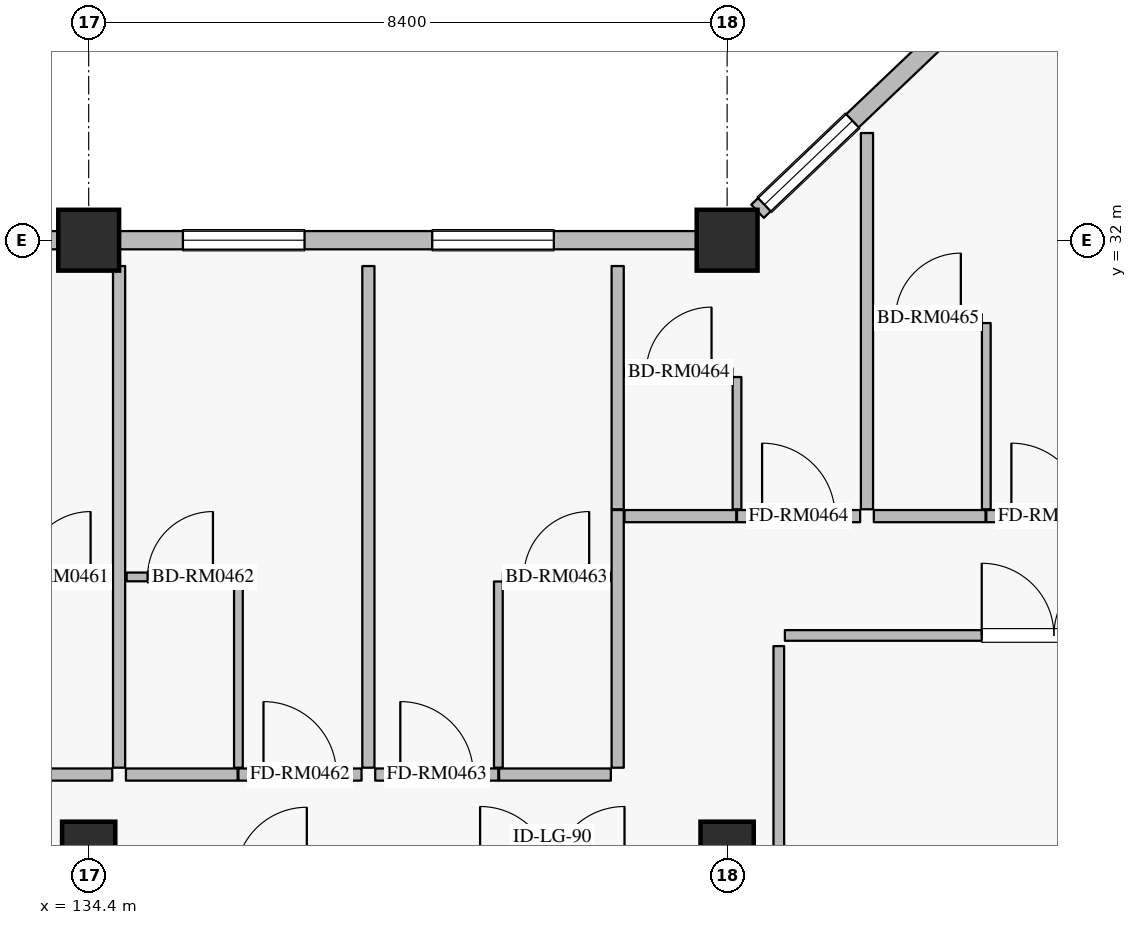
"""IFC4 building model, lengths in metres.
Left out: names, types, materials, properties, quantities, classifications, styles, units other than length and angle.
Written with IfcOpenShell. Run it as: python <this file> out.ifc"""

import sys

from ifc_helpers import new_model, si_unit, direction, frame, frame_2d, origin, origin_2d, place, context, subcontext, project, spatial, rectangle, extrude, element, fill, save


model = new_model("IFC4")
c1 = context("Model", 3, precision=1e-05, world=origin(), true_north=direction((0.0, 1.0)))
c2 = subcontext(c1, "Body", "Model", "MODEL_VIEW")
j1 = project(units=[si_unit("LENGTHUNIT", "METRE"), si_unit("PLANEANGLEUNIT", "RADIAN")], contexts=[c1])
p1 = place(None, origin())
s1 = spatial("IfcSite", under=j1, at=p1, CompositionType="ELEMENT")
p2 = place(p1, origin())
s2 = spatial("IfcBuilding", under=s1, at=p2, CompositionType="ELEMENT")
p3 = place(p2, frame((0.0, 0.0, 16.2)))
s3 = spatial("IfcBuildingStorey", under=s2, at=p3, CompositionType="ELEMENT", Elevation=16.2)
for number, where, z_axis, x_axis in (
    (1, (134.4, 32.0, 0.0), (0.0, 0.0, 1.0), (1.0, 0.0, 0.0)),
    (2, (142.8, 32.0, 0.0), (0.0, 0.0, 1.0), (1.0, 0.0, 0.0)),
):
    element("IfcColumn", number, at=place(p3, frame(where, z_axis=z_axis, x_axis=x_axis)), inside=s3, PredefinedType="COLUMN", context=c2, shape_type="SweptSolid", body=[
        extrude(rectangle(XDim=0.8, YDim=0.8, at=origin_2d()), origin(), (0.0, 0.0, 1.0), 4.8),
    ])
for number, where, z_axis, x_axis in (
    (3, (134.4, 24.0, 0.0), (0.0, 0.0, 1.0), (1.0, 0.0, 0.0)),
    (4, (142.8, 24.0, 0.0), (0.0, 0.0, 1.0), (1.0, 0.0, 0.0)),
):
    element("IfcColumn", number, at=place(p3, frame(where, z_axis=z_axis, x_axis=x_axis)), inside=s3, PredefinedType="COLUMN", context=c2, shape_type="SweptSolid", body=[
        extrude(rectangle(XDim=0.7, YDim=0.7, at=origin_2d()), origin(), (0.0, 0.0, 1.0), 4.8),
    ])
p4 = place(p3, frame((126.4, 32.0, 0.0), z_axis=(0.0, 0.0, 1.0), x_axis=(1.0, 0.0, 0.0)))
e5 = element("IfcWall", 5, at=p4, inside=s3, PredefinedType="SOLIDWALL", context=c2, shape_type="SweptSolid", body=[
    extrude(rectangle(XDim=7.6, YDim=0.24, at=frame_2d((3.8, 0.0))), origin(), (0.0, 0.0, 1.0), 4.09),
])
p5 = place(p4, frame((0.17, 0.0, 0.8)))
e6 = element("IfcOpeningElement", 6, at=p5, cuts=e5, PredefinedType="OPENING", context=c2, shape_type="SweptSolid", body=[
    extrude(rectangle(XDim=1.4, YDim=1.6, at=frame_2d((0.7, 0.8))), frame((0.0, 0.13, 0.0), z_axis=(0.0, -1.0, 0.0), x_axis=(1.0, 0.0, 0.0)), (0.0, 0.0, 1.0), 0.26),
])
p6 = place(p4, frame((2.68, 0.0, 0.8)))
e7 = element("IfcOpeningElement", 7, at=p6, cuts=e5, PredefinedType="OPENING", context=c2, shape_type="SweptSolid", body=[
    extrude(rectangle(XDim=1.6, YDim=1.6, at=frame_2d((0.8, 0.8))), frame((0.0, 0.13, 0.0), z_axis=(0.0, -1.0, 0.0), x_axis=(1.0, 0.0, 0.0)), (0.0, 0.0, 1.0), 0.26),
])
p7 = place(p4, frame((5.61, 0.0, 0.8)))
e8 = element("IfcOpeningElement", 8, at=p7, cuts=e5, PredefinedType="OPENING", context=c2, shape_type="SweptSolid", body=[
    extrude(rectangle(XDim=1.6, YDim=1.6, at=frame_2d((0.8, 0.8))), frame((0.0, 0.13, 0.0), z_axis=(0.0, -1.0, 0.0), x_axis=(1.0, 0.0, 0.0)), (0.0, 0.0, 1.0), 0.26),
])
p8 = place(p3, frame((134.8, 32.0, 0.0), z_axis=(0.0, 0.0, 1.0), x_axis=(1.0, 0.0, 0.0)))
e9 = element("IfcWall", 9, at=p8, inside=s3, PredefinedType="SOLIDWALL", context=c2, shape_type="SweptSolid", body=[
    extrude(rectangle(XDim=7.6, YDim=0.24, at=frame_2d((3.8, 0.0))), origin(), (0.0, 0.0, 1.0), 4.13),
])
p9 = place(p8, frame((0.84, 0.0, 0.8)))
e10 = element("IfcOpeningElement", 10, at=p9, cuts=e9, PredefinedType="OPENING", context=c2, shape_type="SweptSolid", body=[
    extrude(rectangle(XDim=1.6, YDim=1.6, at=frame_2d((0.8, 0.8))), frame((0.0, 0.13, 0.0), z_axis=(0.0, -1.0, 0.0), x_axis=(1.0, 0.0, 0.0)), (0.0, 0.0, 1.0), 0.26),
])
p10 = place(p8, frame((4.12, 0.0, 0.8)))
e11 = element("IfcOpeningElement", 11, at=p10, cuts=e9, PredefinedType="OPENING", context=c2, shape_type="SweptSolid", body=[
    extrude(rectangle(XDim=1.6, YDim=1.6, at=frame_2d((0.8, 0.8))), frame((0.0, 0.13, 0.0), z_axis=(0.0, -1.0, 0.0), x_axis=(1.0, 0.0, 0.0)), (0.0, 0.0, 1.0), 0.26),
])
p11 = place(p3, frame((143.2, 32.381, 0.0), z_axis=(0.0, 0.0, 1.0), x_axis=(0.724156739794, 0.689635422677, 0.0)))
e12 = element("IfcWall", 12, at=p11, inside=s3, PredefinedType="SOLIDWALL", context=c2, shape_type="SweptSolid", body=[
    extrude(rectangle(XDim=10.495, YDim=0.24, at=frame_2d((5.248, 0.0))), origin(), (0.0, 0.0, 1.0), 4.13),
])
p12 = place(p11, frame((0.125, 0.0, 0.8)))
e13 = element("IfcOpeningElement", 13, at=p12, cuts=e12, PredefinedType="OPENING", context=c2, shape_type="SweptSolid", body=[
    extrude(rectangle(XDim=1.6, YDim=1.6, at=frame_2d((0.8, 0.8))), frame((0.0, 0.13, 0.0), z_axis=(0.0, -1.0, 0.0), x_axis=(1.0, 0.0, 0.0)), (0.0, 0.0, 1.0), 0.26),
])
p13 = place(p11, frame((3.453, 0.0, 0.8)))
e14 = element("IfcOpeningElement", 14, at=p13, cuts=e12, PredefinedType="OPENING", context=c2, shape_type="SweptSolid", body=[
    extrude(rectangle(XDim=1.6, YDim=1.6, at=frame_2d((0.8, 0.8))), frame((0.0, 0.13, 0.0), z_axis=(0.0, -1.0, 0.0), x_axis=(1.0, 0.0, 0.0)), (0.0, 0.0, 1.0), 0.26),
])
p14 = place(p11, frame((7.776, 0.0, 0.8)))
e15 = element("IfcOpeningElement", 15, at=p14, cuts=e12, PredefinedType="OPENING", context=c2, shape_type="SweptSolid", body=[
    extrude(rectangle(XDim=1.6, YDim=1.6, at=frame_2d((0.8, 0.8))), frame((0.0, 0.13, 0.0), z_axis=(0.0, -1.0, 0.0), x_axis=(1.0, 0.0, 0.0)), (0.0, 0.0, 1.0), 0.26),
])
p15 = place(p3, frame((133.24, 24.97, 0.0), z_axis=(0.0, 0.0, 1.0), x_axis=(1.0, 0.0, 0.0)))
e16 = element("IfcWall", 16, at=p15, inside=s3, PredefinedType="PARTITIONING", context=c2, shape_type="SweptSolid", body=[
    extrude(rectangle(XDim=1.47, YDim=0.16, at=frame_2d((0.735, 0.0))), origin(), (0.0, 0.0, 1.0), 4.535),
])
p16 = place(p3, frame((133.29, 27.57, 0.0), z_axis=(0.0, 0.0, 1.0), x_axis=(1.0, 0.0, 0.0)))
e17 = element("IfcWall", 17, at=p16, inside=s3, PredefinedType="PARTITIONING", context=c2, shape_type="SweptSolid", body=[
    extrude(rectangle(XDim=1.41, YDim=0.115, at=frame_2d((0.705, 0.0))), origin(), (0.0, 0.0, 1.0), 4.535),
])
p17 = place(p16, frame((0.275, 0.0, 0.0)))
e18 = element("IfcOpeningElement", 18, at=p17, cuts=e17, PredefinedType="OPENING", context=c2, shape_type="SweptSolid", body=[
    extrude(rectangle(XDim=0.86, YDim=2.12, at=frame_2d((0.43, 1.06))), frame((0.0, 0.067, 0.0), z_axis=(0.0, -1.0, 0.0), x_axis=(1.0, 0.0, 0.0)), (0.0, 0.0, 1.0), 0.135),
])
p18 = place(p3, frame((134.89, 24.97, 0.0), z_axis=(0.0, 0.0, 1.0), x_axis=(1.0, 0.0, 0.0)))
e19 = element("IfcWall", 19, at=p18, inside=s3, PredefinedType="PARTITIONING", context=c2, shape_type="SweptSolid", body=[
    extrude(rectangle(XDim=1.47, YDim=0.16, at=frame_2d((0.735, 0.0))), origin(), (0.0, 0.0, 1.0), 4.535),
])
p19 = place(p3, frame((136.37, 24.97, 0.0), z_axis=(0.0, 0.0, 1.0), x_axis=(1.0, 0.0, 0.0)))
e20 = element("IfcWall", 20, at=p19, inside=s3, PredefinedType="PARTITIONING", context=c2, shape_type="SweptSolid", body=[
    extrude(rectangle(XDim=1.62, YDim=0.16, at=frame_2d((0.81, 0.0))), origin(), (0.0, 0.0, 1.0), 4.535),
])
p20 = place(p19, frame((0.33, 0.0, 0.0)))
e21 = element("IfcOpeningElement", 21, at=p20, cuts=e20, PredefinedType="OPENING", context=c2, shape_type="SweptSolid", body=[
    extrude(rectangle(XDim=0.96, YDim=2.2, at=frame_2d((0.48, 1.1))), frame((0.0, 0.09, 0.0), z_axis=(0.0, -1.0, 0.0), x_axis=(1.0, 0.0, 0.0)), (0.0, 0.0, 1.0), 0.18),
])
p21 = place(p3, frame((136.37, 25.06, 0.0), z_axis=(0.0, 0.0, 1.0), x_axis=(0.0, 1.0, 0.0)))
e22 = element("IfcWall", 22, at=p21, inside=s3, PredefinedType="PARTITIONING", context=c2, shape_type="SweptSolid", body=[
    extrude(rectangle(XDim=2.45, YDim=0.115, at=frame_2d((1.225, 0.0))), origin(), (0.0, 0.0, 1.0), 4.535),
])
p22 = place(p3, frame((134.9, 27.57, 0.0), z_axis=(0.0, 0.0, 1.0), x_axis=(1.0, 0.0, 0.0)))
e23 = element("IfcWall", 23, at=p22, inside=s3, PredefinedType="PARTITIONING", context=c2, shape_type="SweptSolid", body=[
    extrude(rectangle(XDim=1.41, YDim=0.115, at=frame_2d((0.705, 0.0))), origin(), (0.0, 0.0, 1.0), 4.535),
])
p23 = place(p22, frame((0.275, 0.0, 0.0)))
e24 = element("IfcOpeningElement", 24, at=p23, cuts=e23, PredefinedType="OPENING", context=c2, shape_type="SweptSolid", body=[
    extrude(rectangle(XDim=0.86, YDim=2.12, at=frame_2d((0.43, 1.06))), frame((0.0, 0.067, 0.0), z_axis=(0.0, -1.0, 0.0), x_axis=(1.0, 0.0, 0.0)), (0.0, 0.0, 1.0), 0.135),
])
p24 = place(p3, frame((134.8, 25.06, 0.0), z_axis=(0.0, 0.0, 1.0), x_axis=(0.0, 1.0, 0.0)))
e25 = element("IfcWall", 25, at=p24, inside=s3, PredefinedType="PARTITIONING", context=c2, shape_type="SweptSolid", body=[
    extrude(rectangle(XDim=6.6, YDim=0.16, at=frame_2d((3.3, 0.0))), origin(), (0.0, 0.0, 1.0), 4.535),
])
p25 = place(p3, frame((138.17, 24.97, 0.0), z_axis=(0.0, 0.0, 1.0), x_axis=(1.0, 0.0, 0.0)))
e26 = element("IfcWall", 26, at=p25, inside=s3, PredefinedType="PARTITIONING", context=c2, shape_type="SweptSolid", body=[
    extrude(rectangle(XDim=1.62, YDim=0.16, at=frame_2d((0.81, 0.0))), origin(), (0.0, 0.0, 1.0), 4.535),
])
p26 = place(p25, frame((0.33, 0.0, 0.0)))
e27 = element("IfcOpeningElement", 27, at=p26, cuts=e26, PredefinedType="OPENING", context=c2, shape_type="SweptSolid", body=[
    extrude(rectangle(XDim=0.96, YDim=2.2, at=frame_2d((0.48, 1.1))), frame((0.0, 0.09, 0.0), z_axis=(0.0, -1.0, 0.0), x_axis=(1.0, 0.0, 0.0)), (0.0, 0.0, 1.0), 0.18),
])
p27 = place(p3, frame((139.8, 24.97, 0.0), z_axis=(0.0, 0.0, 1.0), x_axis=(1.0, 0.0, 0.0)))
e28 = element("IfcWall", 28, at=p27, inside=s3, PredefinedType="PARTITIONING", context=c2, shape_type="SweptSolid", body=[
    extrude(rectangle(XDim=1.47, YDim=0.16, at=frame_2d((0.735, 0.0))), origin(), (0.0, 0.0, 1.0), 4.535),
])
p28 = place(p3, frame((139.79, 25.06, 0.0), z_axis=(0.0, 0.0, 1.0), x_axis=(0.0, 1.0, 0.0)))
e29 = element("IfcWall", 29, at=p28, inside=s3, PredefinedType="PARTITIONING", context=c2, shape_type="SweptSolid", body=[
    extrude(rectangle(XDim=2.45, YDim=0.115, at=frame_2d((1.225, 0.0))), origin(), (0.0, 0.0, 1.0), 4.535),
])
p29 = place(p3, frame((139.85, 27.57, 0.0), z_axis=(0.0, 0.0, 1.0), x_axis=(1.0, 0.0, 0.0)))
e30 = element("IfcWall", 30, at=p29, inside=s3, PredefinedType="PARTITIONING", context=c2, shape_type="SweptSolid", body=[
    extrude(rectangle(XDim=1.41, YDim=0.115, at=frame_2d((0.705, 0.0))), origin(), (0.0, 0.0, 1.0), 4.535),
])
p30 = place(p29, frame((0.275, 0.0, 0.0)))
e31 = element("IfcOpeningElement", 31, at=p30, cuts=e30, PredefinedType="OPENING", context=c2, shape_type="SweptSolid", body=[
    extrude(rectangle(XDim=0.86, YDim=2.12, at=frame_2d((0.43, 1.06))), frame((0.0, 0.067, 0.0), z_axis=(0.0, -1.0, 0.0), x_axis=(1.0, 0.0, 0.0)), (0.0, 0.0, 1.0), 0.135),
])
p31 = place(p3, frame((138.08, 25.06, 0.0), z_axis=(0.0, 0.0, 1.0), x_axis=(0.0, 1.0, 0.0)))
e32 = element("IfcWall", 32, at=p31, inside=s3, PredefinedType="PARTITIONING", context=c2, shape_type="SweptSolid", body=[
    extrude(rectangle(XDim=6.6, YDim=0.16, at=frame_2d((3.3, 0.0))), origin(), (0.0, 0.0, 1.0), 4.535),
])
p32 = place(p3, frame((141.36, 25.06, 0.0), z_axis=(0.0, 0.0, 1.0), x_axis=(0.0, 1.0, 0.0)))
e33 = element("IfcWall", 33, at=p32, inside=s3, PredefinedType="PARTITIONING", context=c2, shape_type="SweptSolid", body=[
    extrude(rectangle(XDim=3.39, YDim=0.16, at=frame_2d((1.695, 0.0))), origin(), (0.0, 0.0, 1.0), 4.535),
])
p33 = place(p3, frame((141.45, 28.37, 0.0), z_axis=(0.0, 0.0, 1.0), x_axis=(1.0, 0.0, 0.0)))
e34 = element("IfcWall", 34, at=p33, inside=s3, PredefinedType="PARTITIONING", context=c2, shape_type="SweptSolid", body=[
    extrude(rectangle(XDim=1.47, YDim=0.16, at=frame_2d((0.735, 0.0))), origin(), (0.0, 0.0, 1.0), 4.535),
])
p34 = place(p3, frame((142.93, 28.37, 0.0), z_axis=(0.0, 0.0, 1.0), x_axis=(1.0, 0.0, 0.0)))
e35 = element("IfcWall", 35, at=p34, inside=s3, PredefinedType="PARTITIONING", context=c2, shape_type="SweptSolid", body=[
    extrude(rectangle(XDim=1.62, YDim=0.16, at=frame_2d((0.81, 0.0))), origin(), (0.0, 0.0, 1.0), 4.535),
])
p35 = place(p34, frame((0.33, 0.0, 0.0)))
e36 = element("IfcOpeningElement", 36, at=p35, cuts=e35, PredefinedType="OPENING", context=c2, shape_type="SweptSolid", body=[
    extrude(rectangle(XDim=0.96, YDim=2.2, at=frame_2d((0.48, 1.1))), frame((0.0, 0.09, 0.0), z_axis=(0.0, -1.0, 0.0), x_axis=(1.0, 0.0, 0.0)), (0.0, 0.0, 1.0), 0.18),
])
p36 = place(p3, frame((142.93, 28.46, 0.0), z_axis=(0.0, 0.0, 1.0), x_axis=(0.0, 1.0, 0.0)))
e37 = element("IfcWall", 37, at=p36, inside=s3, PredefinedType="PARTITIONING", context=c2, shape_type="SweptSolid", body=[
    extrude(rectangle(XDim=1.74, YDim=0.115, at=frame_2d((0.87, 0.0))), origin(), (0.0, 0.0, 1.0), 4.535),
])
p37 = place(p3, frame((141.46, 30.26, 0.0), z_axis=(0.0, 0.0, 1.0), x_axis=(1.0, 0.0, 0.0)))
e38 = element("IfcWall", 38, at=p37, inside=s3, PredefinedType="PARTITIONING", context=c2, shape_type="SweptSolid", body=[
    extrude(rectangle(XDim=1.41, YDim=0.115, at=frame_2d((0.705, 0.0))), origin(), (0.0, 0.0, 1.0), 4.535),
])
p38 = place(p37, frame((0.275, 0.0, 0.0)))
e39 = element("IfcOpeningElement", 39, at=p38, cuts=e38, PredefinedType="OPENING", context=c2, shape_type="SweptSolid", body=[
    extrude(rectangle(XDim=0.86, YDim=2.12, at=frame_2d((0.43, 1.06))), frame((0.0, 0.067, 0.0), z_axis=(0.0, -1.0, 0.0), x_axis=(1.0, 0.0, 0.0)), (0.0, 0.0, 1.0), 0.135),
])
p39 = place(p3, frame((141.36, 28.46, 0.0), z_axis=(0.0, 0.0, 1.0), x_axis=(0.0, 1.0, 0.0)))
e40 = element("IfcWall", 40, at=p39, inside=s3, PredefinedType="PARTITIONING", context=c2, shape_type="SweptSolid", body=[
    extrude(rectangle(XDim=3.2, YDim=0.16, at=frame_2d((1.6, 0.0))), origin(), (0.0, 0.0, 1.0), 4.535),
])
p40 = place(p3, frame((144.73, 28.37, 0.0), z_axis=(0.0, 0.0, 1.0), x_axis=(1.0, 0.0, 0.0)))
e41 = element("IfcWall", 41, at=p40, inside=s3, PredefinedType="PARTITIONING", context=c2, shape_type="SweptSolid", body=[
    extrude(rectangle(XDim=1.47, YDim=0.16, at=frame_2d((0.735, 0.0))), origin(), (0.0, 0.0, 1.0), 4.535),
])
p41 = place(p3, frame((146.21, 28.37, 0.0), z_axis=(0.0, 0.0, 1.0), x_axis=(1.0, 0.0, 0.0)))
e42 = element("IfcWall", 42, at=p41, inside=s3, PredefinedType="PARTITIONING", context=c2, shape_type="SweptSolid", body=[
    extrude(rectangle(XDim=1.62, YDim=0.16, at=frame_2d((0.81, 0.0))), origin(), (0.0, 0.0, 1.0), 4.535),
])
p42 = place(p41, frame((0.33, 0.0, 0.0)))
e43 = element("IfcOpeningElement", 43, at=p42, cuts=e42, PredefinedType="OPENING", context=c2, shape_type="SweptSolid", body=[
    extrude(rectangle(XDim=0.96, YDim=2.2, at=frame_2d((0.48, 1.1))), frame((0.0, 0.09, 0.0), z_axis=(0.0, -1.0, 0.0), x_axis=(1.0, 0.0, 0.0)), (0.0, 0.0, 1.0), 0.18),
])
p43 = place(p3, frame((146.21, 28.46, 0.0), z_axis=(0.0, 0.0, 1.0), x_axis=(0.0, 1.0, 0.0)))
e44 = element("IfcWall", 44, at=p43, inside=s3, PredefinedType="PARTITIONING", context=c2, shape_type="SweptSolid", body=[
    extrude(rectangle(XDim=2.45, YDim=0.115, at=frame_2d((1.225, 0.0))), origin(), (0.0, 0.0, 1.0), 4.535),
])
p44 = place(p3, frame((144.74, 30.97, 0.0), z_axis=(0.0, 0.0, 1.0), x_axis=(1.0, 0.0, 0.0)))
e45 = element("IfcWall", 45, at=p44, inside=s3, PredefinedType="PARTITIONING", context=c2, shape_type="SweptSolid", body=[
    extrude(rectangle(XDim=1.41, YDim=0.115, at=frame_2d((0.705, 0.0))), origin(), (0.0, 0.0, 1.0), 4.535),
])
p45 = place(p44, frame((0.275, 0.0, 0.0)))
e46 = element("IfcOpeningElement", 46, at=p45, cuts=e45, PredefinedType="OPENING", context=c2, shape_type="SweptSolid", body=[
    extrude(rectangle(XDim=0.86, YDim=2.12, at=frame_2d((0.43, 1.06))), frame((0.0, 0.067, 0.0), z_axis=(0.0, -1.0, 0.0), x_axis=(1.0, 0.0, 0.0)), (0.0, 0.0, 1.0), 0.135),
])
p46 = place(p3, frame((144.64, 28.46, 0.0), z_axis=(0.0, 0.0, 1.0), x_axis=(0.0, 1.0, 0.0)))
e47 = element("IfcWall", 47, at=p46, inside=s3, PredefinedType="PARTITIONING", context=c2, shape_type="SweptSolid", body=[
    extrude(rectangle(XDim=4.95, YDim=0.16, at=frame_2d((2.475, 0.0))), origin(), (0.0, 0.0, 1.0), 4.535),
])
p47 = place(p3, frame((143.56, 26.8, 0.0), z_axis=(0.0, 0.0, 1.0), x_axis=(1.0, 0.0, 0.0)))
e48 = element("IfcWall", 48, at=p47, inside=s3, PredefinedType="PARTITIONING", context=c2, shape_type="SweptSolid", body=[
    extrude(rectangle(XDim=7.08, YDim=0.14, at=frame_2d((3.54, 0.0))), origin(), (0.0, 0.0, 1.0), 4.535),
])
p48 = place(p47, frame((2.59, 0.0, 0.0)))
e49 = element("IfcOpeningElement", 49, at=p48, cuts=e48, PredefinedType="OPENING", context=c2, shape_type="SweptSolid", body=[
    extrude(rectangle(XDim=1.9, YDim=2.4, at=frame_2d((0.95, 1.2))), frame((0.0, 0.08, 0.0), z_axis=(0.0, -1.0, 0.0), x_axis=(1.0, 0.0, 0.0)), (0.0, 0.0, 1.0), 0.16),
])
p49 = place(p3, frame((143.48, 23.45, 0.0), z_axis=(0.0, 0.0, 1.0), x_axis=(0.0, 1.0, 0.0)))
e50 = element("IfcWall", 50, at=p49, inside=s3, PredefinedType="PARTITIONING", context=c2, shape_type="SweptSolid", body=[
    extrude(rectangle(XDim=3.21, YDim=0.14, at=frame_2d((1.605, 0.0))), origin(), (0.0, 0.0, 1.0), 4.535),
])
p50 = place(p9, origin())
e51 = element("IfcWindow", 51, at=p50, inside=s3, PartitioningType="SINGLE_PANEL", PredefinedType="WINDOW", context=c2, shape_type="SweptSolid", body=[
    extrude(rectangle(XDim=1.6, YDim=1.6, at=frame_2d((0.8, 0.8))), frame((0.0, 0.03, 0.0), z_axis=(0.0, -1.0, 0.0), x_axis=(1.0, 0.0, 0.0)), (0.0, 0.0, 1.0), 0.06),
])
fill(e10, e51)
p51 = place(p10, origin())
e52 = element("IfcWindow", 52, at=p51, inside=s3, PartitioningType="SINGLE_PANEL", PredefinedType="WINDOW", context=c2, shape_type="SweptSolid", body=[
    extrude(rectangle(XDim=1.6, YDim=1.6, at=frame_2d((0.8, 0.8))), frame((0.0, 0.03, 0.0), z_axis=(0.0, -1.0, 0.0), x_axis=(1.0, 0.0, 0.0)), (0.0, 0.0, 1.0), 0.06),
])
fill(e11, e52)
p52 = place(p12, origin())
e53 = element("IfcWindow", 53, at=p52, inside=s3, PartitioningType="SINGLE_PANEL", PredefinedType="WINDOW", context=c2, shape_type="SweptSolid", body=[
    extrude(rectangle(XDim=1.6, YDim=1.6, at=frame_2d((0.8, 0.8))), frame((0.0, 0.03, 0.0), z_axis=(0.0, -1.0, 0.0), x_axis=(1.0, 0.0, 0.0)), (0.0, 0.0, 1.0), 0.06),
])
fill(e13, e53)
p53 = place(p17, origin())
e54 = element("IfcDoor", 54, at=p53, inside=s3, OperationType="SINGLE_SWING_RIGHT", PredefinedType="DOOR", context=c2, shape_type="SweptSolid", body=[
    extrude(rectangle(XDim=0.86, YDim=2.12, at=frame_2d((0.43, 1.06))), frame((0.0, 0.025, 0.0), z_axis=(0.0, -1.0, 0.0), x_axis=(1.0, 0.0, 0.0)), (0.0, 0.0, 1.0), 0.05),
])
fill(e18, e54)
p54 = place(p20, origin())
e55 = element("IfcDoor", 55, at=p54, inside=s3, OperationType="SINGLE_SWING_LEFT", PredefinedType="DOOR", context=c2, shape_type="SweptSolid", body=[
    extrude(rectangle(XDim=0.96, YDim=2.2, at=frame_2d((0.48, 1.1))), frame((0.0, 0.025, 0.0), z_axis=(0.0, -1.0, 0.0), x_axis=(1.0, 0.0, 0.0)), (0.0, 0.0, 1.0), 0.05),
])
fill(e21, e55)
p55 = place(p23, origin())
e56 = element("IfcDoor", 56, at=p55, inside=s3, OperationType="SINGLE_SWING_RIGHT", PredefinedType="DOOR", context=c2, shape_type="SweptSolid", body=[
    extrude(rectangle(XDim=0.86, YDim=2.12, at=frame_2d((0.43, 1.06))), frame((0.0, 0.025, 0.0), z_axis=(0.0, -1.0, 0.0), x_axis=(1.0, 0.0, 0.0)), (0.0, 0.0, 1.0), 0.05),
])
fill(e24, e56)
p56 = place(p26, origin())
e57 = element("IfcDoor", 57, at=p56, inside=s3, OperationType="SINGLE_SWING_LEFT", PredefinedType="DOOR", context=c2, shape_type="SweptSolid", body=[
    extrude(rectangle(XDim=0.96, YDim=2.2, at=frame_2d((0.48, 1.1))), frame((0.0, 0.025, 0.0), z_axis=(0.0, -1.0, 0.0), x_axis=(1.0, 0.0, 0.0)), (0.0, 0.0, 1.0), 0.05),
])
fill(e27, e57)
p57 = place(p30, origin())
e58 = element("IfcDoor", 58, at=p57, inside=s3, OperationType="SINGLE_SWING_RIGHT", PredefinedType="DOOR", context=c2, shape_type="SweptSolid", body=[
    extrude(rectangle(XDim=0.86, YDim=2.12, at=frame_2d((0.43, 1.06))), frame((0.0, 0.025, 0.0), z_axis=(0.0, -1.0, 0.0), x_axis=(1.0, 0.0, 0.0)), (0.0, 0.0, 1.0), 0.05),
])
fill(e31, e58)
p58 = place(p35, origin())
e59 = element("IfcDoor", 59, at=p58, inside=s3, OperationType="SINGLE_SWING_LEFT", PredefinedType="DOOR", context=c2, shape_type="SweptSolid", body=[
    extrude(rectangle(XDim=0.96, YDim=2.2, at=frame_2d((0.48, 1.1))), frame((0.0, 0.025, 0.0), z_axis=(0.0, -1.0, 0.0), x_axis=(1.0, 0.0, 0.0)), (0.0, 0.0, 1.0), 0.05),
])
fill(e36, e59)
p59 = place(p38, origin())
e60 = element("IfcDoor", 60, at=p59, inside=s3, OperationType="SINGLE_SWING_RIGHT", PredefinedType="DOOR", context=c2, shape_type="SweptSolid", body=[
    extrude(rectangle(XDim=0.86, YDim=2.12, at=frame_2d((0.43, 1.06))), frame((0.0, 0.025, 0.0), z_axis=(0.0, -1.0, 0.0), x_axis=(1.0, 0.0, 0.0)), (0.0, 0.0, 1.0), 0.05),
])
fill(e39, e60)
p60 = place(p42, origin())
e61 = element("IfcDoor", 61, at=p60, inside=s3, OperationType="SINGLE_SWING_LEFT", PredefinedType="DOOR", context=c2, shape_type="SweptSolid", body=[
    extrude(rectangle(XDim=0.96, YDim=2.2, at=frame_2d((0.48, 1.1))), frame((0.0, 0.025, 0.0), z_axis=(0.0, -1.0, 0.0), x_axis=(1.0, 0.0, 0.0)), (0.0, 0.0, 1.0), 0.05),
])
fill(e43, e61)
p61 = place(p45, origin())
e62 = element("IfcDoor", 62, at=p61, inside=s3, OperationType="SINGLE_SWING_RIGHT", PredefinedType="DOOR", context=c2, shape_type="SweptSolid", body=[
    extrude(rectangle(XDim=0.86, YDim=2.12, at=frame_2d((0.43, 1.06))), frame((0.0, 0.025, 0.0), z_axis=(0.0, -1.0, 0.0), x_axis=(1.0, 0.0, 0.0)), (0.0, 0.0, 1.0), 0.05),
])
fill(e46, e62)
p62 = place(p48, origin())
e63 = element("IfcDoor", 63, at=p62, inside=s3, OperationType="DOUBLE_DOOR_SINGLE_SWING", PredefinedType="DOOR", context=c2, shape_type="SweptSolid", body=[
    extrude(rectangle(XDim=1.9, YDim=2.4, at=frame_2d((0.95, 1.2))), frame((0.0, 0.025, 0.0), z_axis=(0.0, -1.0, 0.0), x_axis=(1.0, 0.0, 0.0)), (0.0, 0.0, 1.0), 0.05),
])
fill(e49, e63)
save(model, sys.argv[1])
